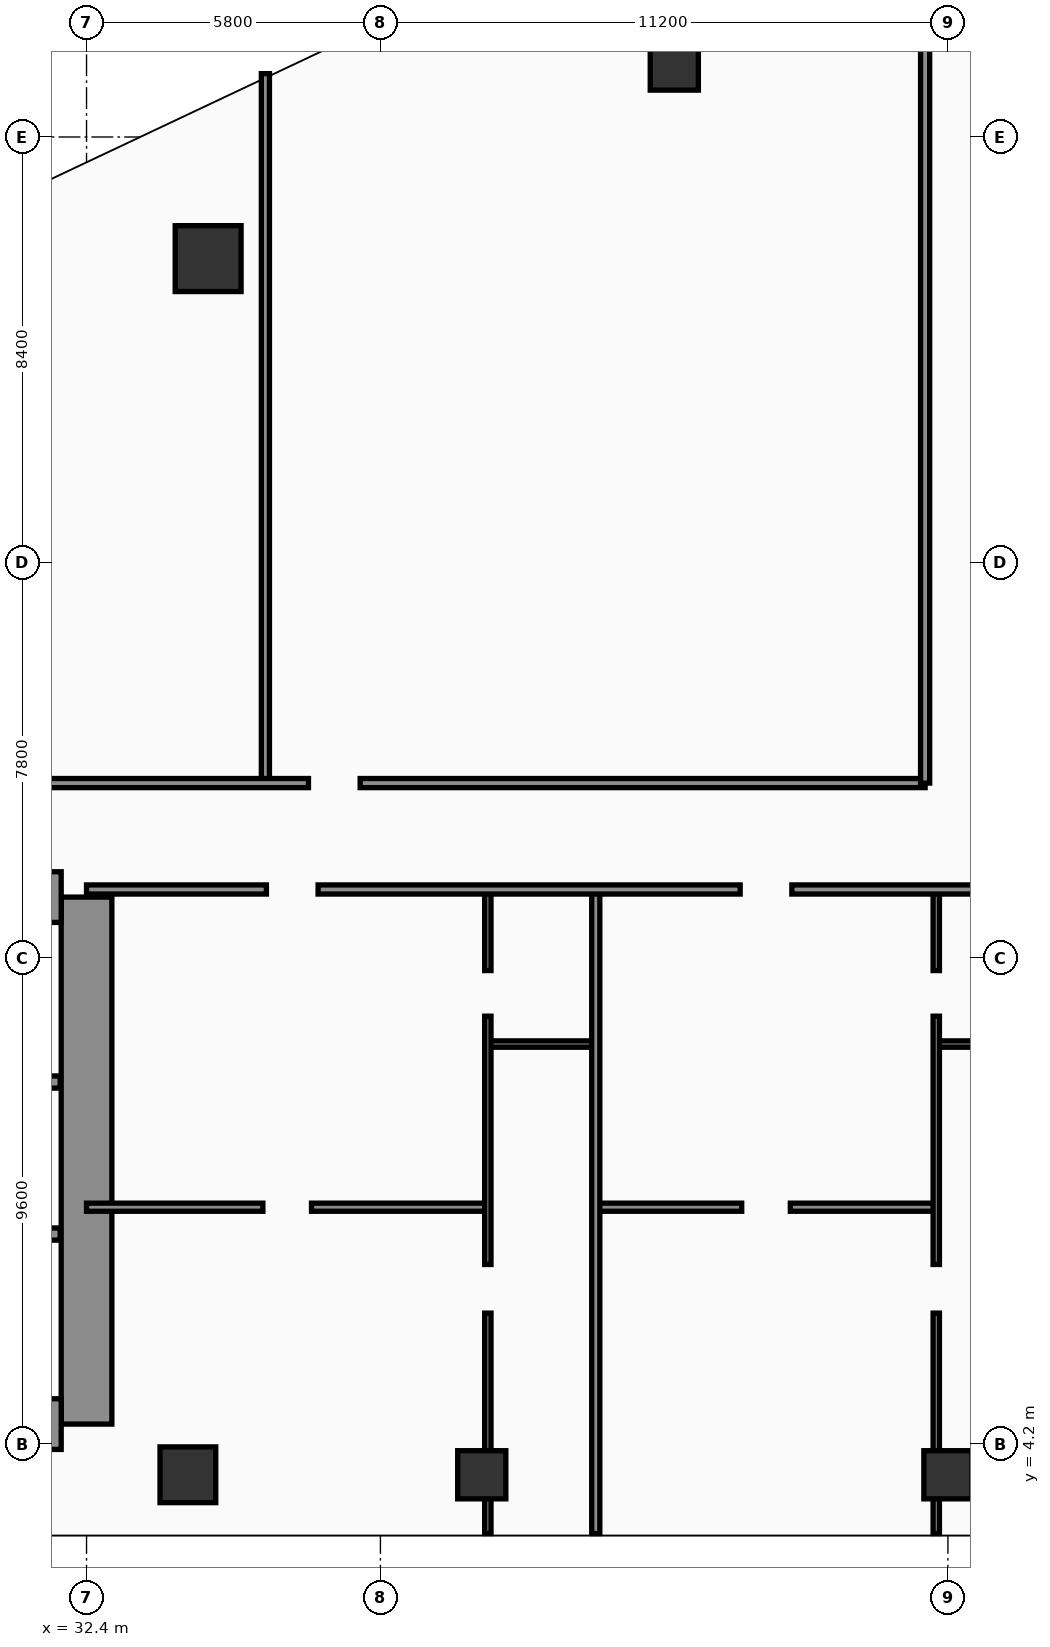
"""IFC4 building model, lengths in metres.
Left out: names, types, materials, properties, quantities, classifications, styles, units other than length and angle.
Written with IfcOpenShell. Run it as: python <this file> out.ifc"""

import sys

from ifc_helpers import new_model, si_unit, direction, frame, frame_2d, origin, origin_2d, place, context, subcontext, project, spatial, rectangle, hollow_rectangle, circle, extrude, element, fill, save


model = new_model("IFC4")
c1 = context("Model", 3, precision=1e-05, world=origin(), true_north=direction((0.0, 1.0)))
c2 = subcontext(c1, "Body", "Model", "MODEL_VIEW")
j1 = project(units=[si_unit("LENGTHUNIT", "METRE"), si_unit("PLANEANGLEUNIT", "RADIAN")], contexts=[c1])
p1 = place(None, origin())
s1 = spatial("IfcSite", under=j1, at=p1, CompositionType="ELEMENT")
p2 = place(p1, origin())
s2 = spatial("IfcBuilding", under=s1, at=p2, CompositionType="ELEMENT")
p3 = place(p2, frame((0.0, 0.0, 66.0)))
s3 = spatial("IfcBuildingStorey", under=s2, at=p3, CompositionType="ELEMENT", Elevation=66.0)
p4 = place(p3, frame((32.4, 4.6, 0.0), z_axis=(0.0, 0.0, 1.0), x_axis=(0.0, 1.0, 0.0)))
e1 = element("IfcWall", 1, at=p4, inside=s3, PredefinedType="SHEAR", context=c2, shape_type="SweptSolid", body=[
    extrude(rectangle(XDim=10.4, YDim=1.0, at=frame_2d((5.2, 0.0))), origin(), (0.0, 0.0, 1.0), 3.56),
])
p5 = place(p3, frame((22.1, 15.0, 0.0), z_axis=(0.0, 0.0, 1.0), x_axis=(1.0, 0.0, 0.0)))
e2 = element("IfcWall", 2, at=p5, inside=s3, PredefinedType="SHEAR", context=c2, shape_type="SweptSolid", body=[
    extrude(rectangle(XDim=9.8, YDim=1.0, at=frame_2d((4.9, 0.0))), origin(), (0.0, 0.0, 1.0), 3.56),
])
p6 = place(p5, frame((4.8, 0.0, 0.0)))
e3 = element("IfcOpeningElement", 3, at=p6, cuts=e2, PredefinedType="OPENING", context=c2, shape_type="SweptSolid", body=[
    extrude(rectangle(XDim=1.1, YDim=2.2, at=frame_2d((0.55, 1.1))), frame((0.0, 0.51, 0.0), z_axis=(0.0, -1.0, 0.0), x_axis=(1.0, 0.0, 0.0)), (0.0, 0.0, 1.0), 1.02),
])
p7 = place(p3, frame((22.1, 4.6, 0.0), z_axis=(0.0, 0.0, 1.0), x_axis=(1.0, 0.0, 0.0)))
e4 = element("IfcWall", 4, at=p7, inside=s3, PredefinedType="SHEAR", context=c2, shape_type="SweptSolid", body=[
    extrude(rectangle(XDim=9.8, YDim=1.0, at=frame_2d((4.9, 0.0))), origin(), (0.0, 0.0, 1.0), 3.56),
])
p8 = place(p3, frame((34.4, 3.6, 0.0), z_axis=(0.0, 0.0, 1.0), x_axis=(1.0, 0.0, 0.0)))
e5 = element("IfcColumn", 5, at=p8, inside=s3, PredefinedType="COLUMN", context=c2, shape_type="SweptSolid", body=[
    extrude(hollow_rectangle(XDim=1.1, YDim=1.1, WallThickness=0.045, at=origin_2d()), origin(), (0.0, 0.0, 1.0), 3.56),
])
for number, where, z_axis, x_axis in (
    (6, (40.2, 3.6, 0.0), (0.0, 0.0, 1.0), (1.0, 0.0, 0.0)),
    (7, (49.4, 3.6, 0.0), (0.0, 0.0, 1.0), (1.0, 0.0, 0.0)),
):
    element("IfcColumn", number, at=place(p3, frame(where, z_axis=z_axis, x_axis=x_axis)), inside=s3, PredefinedType="COLUMN", context=c2, shape_type="SweptSolid", body=[
        extrude(hollow_rectangle(XDim=0.95, YDim=0.95, WallThickness=0.04, at=origin_2d()), origin(), (0.0, 0.0, 1.0), 3.56),
    ])
p9 = place(p3, frame((34.8, 27.6, 0.0), z_axis=(0.0, 0.0, 1.0), x_axis=(1.0, 0.0, 0.0)))
e8 = element("IfcColumn", 8, at=p9, inside=s3, PredefinedType="COLUMN", context=c2, shape_type="SweptSolid", body=[
    extrude(circle(Radius=0.65, at=origin_2d()), origin(), (0.0, 0.0, 1.0), 3.56),
])
p10 = place(p3, frame((44.0, 31.4, 0.0), z_axis=(0.0, 0.0, 1.0), x_axis=(1.0, 0.0, 0.0)))
e9 = element("IfcColumn", 9, at=p10, inside=s3, PredefinedType="COLUMN", context=c2, shape_type="SweptSolid", body=[
    extrude(hollow_rectangle(XDim=0.95, YDim=0.95, WallThickness=0.04, at=origin_2d()), origin(), (0.0, 0.0, 1.0), 3.56),
])
p11 = place(p3, frame((27.02, 11.35, 0.0), z_axis=(0.0, 0.0, 1.0), x_axis=(1.0, 0.0, 0.0)))
e10 = element("IfcWall", 10, at=p11, inside=s3, PredefinedType="SOLIDWALL", context=c2, shape_type="SweptSolid", body=[
    extrude(rectangle(XDim=4.86, YDim=0.24, at=frame_2d((2.43, 0.0))), origin(), (0.0, 0.0, 1.0), 3.56),
])
p12 = place(p11, frame((0.45, 0.0, 0.0)))
e11 = element("IfcOpeningElement", 11, at=p12, cuts=e10, PredefinedType="OPENING", context=c2, shape_type="SweptSolid", body=[
    extrude(rectangle(XDim=1.3, YDim=2.35, at=frame_2d((0.65, 1.175))), frame((0.0, 0.13, 0.0), z_axis=(0.0, -1.0, 0.0), x_axis=(1.0, 0.0, 0.0)), (0.0, 0.0, 1.0), 0.26),
])
p13 = place(p3, frame((27.02, 8.35, 0.0), z_axis=(0.0, 0.0, 1.0), x_axis=(1.0, 0.0, 0.0)))
e12 = element("IfcWall", 12, at=p13, inside=s3, PredefinedType="SOLIDWALL", context=c2, shape_type="SweptSolid", body=[
    extrude(rectangle(XDim=4.86, YDim=0.24, at=frame_2d((2.43, 0.0))), origin(), (0.0, 0.0, 1.0), 3.56),
])
p14 = place(p3, frame((40.32, 12.1, 0.0), z_axis=(0.0, 0.0, 1.0), x_axis=(1.0, 0.0, 0.0)))
e13 = element("IfcWall", 13, at=p14, inside=s3, PredefinedType="PARTITIONING", context=c2, shape_type="SweptSolid", body=[
    extrude(rectangle(XDim=2.13, YDim=0.125, at=frame_2d((1.065, 0.0))), origin(), (0.0, 0.0, 1.0), 3.56),
])
p15 = place(p3, frame((32.4, 8.88, 0.0), z_axis=(0.0, 0.0, 1.0), x_axis=(1.0, 0.0, 0.0)))
e14 = element("IfcWall", 14, at=p15, inside=s3, PredefinedType="PARTITIONING", context=c2, shape_type="SweptSolid", body=[
    extrude(rectangle(XDim=7.92, YDim=0.16, at=frame_2d((3.96, 0.0))), origin(), (0.0, 0.0, 1.0), 2.84),
])
p16 = place(p15, frame((3.48, 0.0, 0.0)))
e15 = element("IfcOpeningElement", 15, at=p16, cuts=e14, PredefinedType="OPENING", context=c2, shape_type="SweptSolid", body=[
    extrude(rectangle(XDim=0.96, YDim=2.2, at=frame_2d((0.48, 1.1))), frame((0.0, 0.09, 0.0), z_axis=(0.0, -1.0, 0.0), x_axis=(1.0, 0.0, 0.0)), (0.0, 0.0, 1.0), 0.18),
])
p17 = place(p3, frame((40.32, 2.44, 0.0), z_axis=(0.0, 0.0, 1.0), x_axis=(0.0, 1.0, 0.0)))
e16 = element("IfcWall", 16, at=p17, inside=s3, PredefinedType="PARTITIONING", context=c2, shape_type="SweptSolid", body=[
    extrude(rectangle(XDim=12.71, YDim=0.125, at=frame_2d((6.355, 0.0))), origin(), (0.0, 0.0, 1.0), 2.84),
])
p18 = place(p17, frame((4.35, 0.0, 0.0)))
e17 = element("IfcOpeningElement", 17, at=p18, cuts=e16, PredefinedType="OPENING", context=c2, shape_type="SweptSolid", body=[
    extrude(rectangle(XDim=0.96, YDim=2.2, at=frame_2d((0.48, 1.1))), frame((0.0, 0.073, 0.0), z_axis=(0.0, -1.0, 0.0), x_axis=(1.0, 0.0, 0.0)), (0.0, 0.0, 1.0), 0.145),
])
p19 = place(p17, frame((10.21, 0.0, 0.0)))
e18 = element("IfcOpeningElement", 18, at=p19, cuts=e16, PredefinedType="OPENING", context=c2, shape_type="SweptSolid", body=[
    extrude(rectangle(XDim=0.9, YDim=2.15, at=frame_2d((0.45, 1.075))), frame((0.0, 0.073, 0.0), z_axis=(0.0, -1.0, 0.0), x_axis=(1.0, 0.0, 0.0)), (0.0, 0.0, 1.0), 0.145),
])
p20 = place(p3, frame((49.17, 12.1, 0.0), z_axis=(0.0, 0.0, 1.0), x_axis=(1.0, 0.0, 0.0)))
e19 = element("IfcWall", 19, at=p20, inside=s3, PredefinedType="PARTITIONING", context=c2, shape_type="SweptSolid", body=[
    extrude(rectangle(XDim=2.13, YDim=0.125, at=frame_2d((1.065, 0.0))), origin(), (0.0, 0.0, 1.0), 3.56),
])
p21 = place(p3, frame((42.45, 8.88, 0.0), z_axis=(0.0, 0.0, 1.0), x_axis=(1.0, 0.0, 0.0)))
e20 = element("IfcWall", 20, at=p21, inside=s3, PredefinedType="PARTITIONING", context=c2, shape_type="SweptSolid", body=[
    extrude(rectangle(XDim=6.72, YDim=0.16, at=frame_2d((3.36, 0.0))), origin(), (0.0, 0.0, 1.0), 2.84),
])
p22 = place(p21, frame((2.88, 0.0, 0.0)))
e21 = element("IfcOpeningElement", 21, at=p22, cuts=e20, PredefinedType="OPENING", context=c2, shape_type="SweptSolid", body=[
    extrude(rectangle(XDim=0.96, YDim=2.2, at=frame_2d((0.48, 1.1))), frame((0.0, 0.09, 0.0), z_axis=(0.0, -1.0, 0.0), x_axis=(1.0, 0.0, 0.0)), (0.0, 0.0, 1.0), 0.18),
])
p23 = place(p3, frame((49.17, 2.44, 0.0), z_axis=(0.0, 0.0, 1.0), x_axis=(0.0, 1.0, 0.0)))
e22 = element("IfcWall", 22, at=p23, inside=s3, PredefinedType="PARTITIONING", context=c2, shape_type="SweptSolid", body=[
    extrude(rectangle(XDim=12.71, YDim=0.125, at=frame_2d((6.355, 0.0))), origin(), (0.0, 0.0, 1.0), 2.84),
])
p24 = place(p23, frame((4.35, 0.0, 0.0)))
e23 = element("IfcOpeningElement", 23, at=p24, cuts=e22, PredefinedType="OPENING", context=c2, shape_type="SweptSolid", body=[
    extrude(rectangle(XDim=0.96, YDim=2.2, at=frame_2d((0.48, 1.1))), frame((0.0, 0.073, 0.0), z_axis=(0.0, -1.0, 0.0), x_axis=(1.0, 0.0, 0.0)), (0.0, 0.0, 1.0), 0.145),
])
p25 = place(p23, frame((10.21, 0.0, 0.0)))
e24 = element("IfcOpeningElement", 24, at=p25, cuts=e22, PredefinedType="OPENING", context=c2, shape_type="SweptSolid", body=[
    extrude(rectangle(XDim=0.9, YDim=2.15, at=frame_2d((0.45, 1.075))), frame((0.0, 0.073, 0.0), z_axis=(0.0, -1.0, 0.0), x_axis=(1.0, 0.0, 0.0)), (0.0, 0.0, 1.0), 0.145),
])
p26 = place(p3, frame((42.45, 2.44, 0.0), z_axis=(0.0, 0.0, 1.0), x_axis=(0.0, 1.0, 0.0)))
e25 = element("IfcWall", 25, at=p26, inside=s3, PredefinedType="PARTITIONING", context=c2, shape_type="SweptSolid", body=[
    extrude(rectangle(XDim=12.71, YDim=0.16, at=frame_2d((6.355, 0.0))), origin(), (0.0, 0.0, 1.0), 3.04),
])
p27 = place(p3, frame((32.4, 15.15, 0.0), z_axis=(0.0, 0.0, 1.0), x_axis=(1.0, 0.0, 0.0)))
e26 = element("IfcWall", 26, at=p27, inside=s3, PredefinedType="PARTITIONING", context=c2, shape_type="SweptSolid", body=[
    extrude(rectangle(XDim=18.9, YDim=0.18, at=frame_2d((9.45, 0.0))), origin(), (0.0, 0.0, 1.0), 2.84),
])
p28 = place(p27, frame((3.55, 0.0, 0.0)))
e27 = element("IfcOpeningElement", 27, at=p28, cuts=e26, PredefinedType="OPENING", context=c2, shape_type="SweptSolid", body=[
    extrude(rectangle(XDim=1.02, YDim=2.2, at=frame_2d((0.51, 1.1))), frame((0.0, 0.1, 0.0), z_axis=(0.0, -1.0, 0.0), x_axis=(1.0, 0.0, 0.0)), (0.0, 0.0, 1.0), 0.2),
])
p29 = place(p27, frame((12.9, 0.0, 0.0)))
e28 = element("IfcOpeningElement", 28, at=p29, cuts=e26, PredefinedType="OPENING", context=c2, shape_type="SweptSolid", body=[
    extrude(rectangle(XDim=1.02, YDim=2.2, at=frame_2d((0.51, 1.1))), frame((0.0, 0.1, 0.0), z_axis=(0.0, -1.0, 0.0), x_axis=(1.0, 0.0, 0.0)), (0.0, 0.0, 1.0), 0.2),
])
p30 = place(p3, frame((35.93, 17.25, 0.0), z_axis=(0.0, 0.0, 1.0), x_axis=(0.0, 1.0, 0.0)))
e29 = element("IfcWall", 29, at=p30, inside=s3, PredefinedType="PARTITIONING", context=c2, shape_type="SweptSolid", body=[
    extrude(rectangle(XDim=14.0, YDim=0.16, at=frame_2d((7.0, 0.0))), origin(), (0.0, 0.0, 1.0), 2.84),
])
p31 = place(p3, frame((21.5, 17.25, 0.0), z_axis=(0.0, 0.0, 1.0), x_axis=(1.0, 0.0, 0.0)))
e30 = element("IfcWall", 30, at=p31, inside=s3, PredefinedType="PARTITIONING", context=c2, shape_type="SweptSolid", body=[
    extrude(rectangle(XDim=27.45, YDim=0.18, at=frame_2d((13.725, 0.0))), origin(), (0.0, 0.0, 1.0), 2.84),
])
p32 = place(p31, frame((0.95, 0.0, 0.0)))
e31 = element("IfcOpeningElement", 31, at=p32, cuts=e30, PredefinedType="OPENING", context=c2, shape_type="SweptSolid", body=[
    extrude(rectangle(XDim=1.02, YDim=2.2, at=frame_2d((0.51, 1.1))), frame((0.0, 0.1, 0.0), z_axis=(0.0, -1.0, 0.0), x_axis=(1.0, 0.0, 0.0)), (0.0, 0.0, 1.0), 0.2),
])
p33 = place(p31, frame((15.28, 0.0, 0.0)))
e32 = element("IfcOpeningElement", 32, at=p33, cuts=e30, PredefinedType="OPENING", context=c2, shape_type="SweptSolid", body=[
    extrude(rectangle(XDim=1.02, YDim=2.2, at=frame_2d((0.51, 1.1))), frame((0.0, 0.1, 0.0), z_axis=(0.0, -1.0, 0.0), x_axis=(1.0, 0.0, 0.0)), (0.0, 0.0, 1.0), 0.2),
])
p34 = place(p3, frame((48.95, 17.25, 0.0), z_axis=(0.0, 0.0, 1.0), x_axis=(0.0, 1.0, 0.0)))
e33 = element("IfcWall", 33, at=p34, inside=s3, PredefinedType="PARTITIONING", context=c2, shape_type="SweptSolid", body=[
    extrude(rectangle(XDim=20.15, YDim=0.18, at=frame_2d((10.075, 0.0))), origin(), (0.0, 0.0, 1.0), 2.84),
])
p35 = place(p16, origin())
e34 = element("IfcDoor", 34, at=p35, inside=s3, OperationType="SINGLE_SWING_LEFT", PredefinedType="DOOR", context=c2, shape_type="SweptSolid", body=[
    extrude(rectangle(XDim=0.96, YDim=2.2, at=frame_2d((0.48, 1.1))), frame((0.0, 0.025, 0.0), z_axis=(0.0, -1.0, 0.0), x_axis=(1.0, 0.0, 0.0)), (0.0, 0.0, 1.0), 0.05),
])
fill(e15, e34)
p36 = place(p18, origin())
e35 = element("IfcDoor", 35, at=p36, inside=s3, OperationType="SINGLE_SWING_LEFT", PredefinedType="DOOR", context=c2, shape_type="SweptSolid", body=[
    extrude(rectangle(XDim=0.96, YDim=2.2, at=frame_2d((0.48, 1.1))), frame((0.0, 0.025, 0.0), z_axis=(0.0, -1.0, 0.0), x_axis=(1.0, 0.0, 0.0)), (0.0, 0.0, 1.0), 0.05),
])
fill(e17, e35)
p37 = place(p19, origin())
e36 = element("IfcDoor", 36, at=p37, inside=s3, OperationType="SINGLE_SWING_RIGHT", PredefinedType="DOOR", context=c2, shape_type="SweptSolid", body=[
    extrude(rectangle(XDim=0.9, YDim=2.15, at=frame_2d((0.45, 1.075))), frame((0.0, 0.025, 0.0), z_axis=(0.0, -1.0, 0.0), x_axis=(1.0, 0.0, 0.0)), (0.0, 0.0, 1.0), 0.05),
])
fill(e18, e36)
p38 = place(p22, origin())
e37 = element("IfcDoor", 37, at=p38, inside=s3, OperationType="SINGLE_SWING_LEFT", PredefinedType="DOOR", context=c2, shape_type="SweptSolid", body=[
    extrude(rectangle(XDim=0.96, YDim=2.2, at=frame_2d((0.48, 1.1))), frame((0.0, 0.025, 0.0), z_axis=(0.0, -1.0, 0.0), x_axis=(1.0, 0.0, 0.0)), (0.0, 0.0, 1.0), 0.05),
])
fill(e21, e37)
p39 = place(p24, origin())
e38 = element("IfcDoor", 38, at=p39, inside=s3, OperationType="SINGLE_SWING_LEFT", PredefinedType="DOOR", context=c2, shape_type="SweptSolid", body=[
    extrude(rectangle(XDim=0.96, YDim=2.2, at=frame_2d((0.48, 1.1))), frame((0.0, 0.025, 0.0), z_axis=(0.0, -1.0, 0.0), x_axis=(1.0, 0.0, 0.0)), (0.0, 0.0, 1.0), 0.05),
])
fill(e23, e38)
p40 = place(p25, origin())
e39 = element("IfcDoor", 39, at=p40, inside=s3, OperationType="SINGLE_SWING_RIGHT", PredefinedType="DOOR", context=c2, shape_type="SweptSolid", body=[
    extrude(rectangle(XDim=0.9, YDim=2.15, at=frame_2d((0.45, 1.075))), frame((0.0, 0.025, 0.0), z_axis=(0.0, -1.0, 0.0), x_axis=(1.0, 0.0, 0.0)), (0.0, 0.0, 1.0), 0.05),
])
fill(e24, e39)
p41 = place(p28, origin())
e40 = element("IfcDoor", 40, at=p41, inside=s3, OperationType="SINGLE_SWING_LEFT", PredefinedType="DOOR", context=c2, shape_type="SweptSolid", body=[
    extrude(rectangle(XDim=1.02, YDim=2.2, at=frame_2d((0.51, 1.1))), frame((0.0, 0.025, 0.0), z_axis=(0.0, -1.0, 0.0), x_axis=(1.0, 0.0, 0.0)), (0.0, 0.0, 1.0), 0.05),
])
fill(e27, e40)
p42 = place(p29, origin())
e41 = element("IfcDoor", 41, at=p42, inside=s3, OperationType="SINGLE_SWING_RIGHT", PredefinedType="DOOR", context=c2, shape_type="SweptSolid", body=[
    extrude(rectangle(XDim=1.02, YDim=2.2, at=frame_2d((0.51, 1.1))), frame((0.0, 0.025, 0.0), z_axis=(0.0, -1.0, 0.0), x_axis=(1.0, 0.0, 0.0)), (0.0, 0.0, 1.0), 0.05),
])
fill(e28, e41)
p43 = place(p33, origin())
e42 = element("IfcDoor", 42, at=p43, inside=s3, OperationType="SINGLE_SWING_LEFT", PredefinedType="DOOR", context=c2, shape_type="SweptSolid", body=[
    extrude(rectangle(XDim=1.02, YDim=2.2, at=frame_2d((0.51, 1.1))), frame((0.0, 0.025, 0.0), z_axis=(0.0, -1.0, 0.0), x_axis=(1.0, 0.0, 0.0)), (0.0, 0.0, 1.0), 0.05),
])
fill(e32, e42)
save(model, sys.argv[1])
